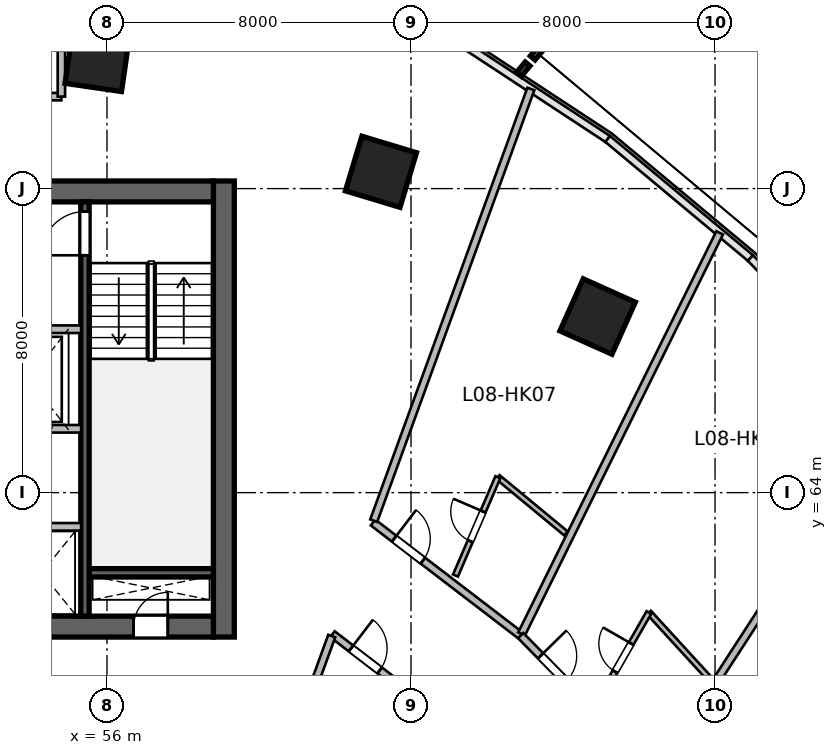
"""IFC4 building model, lengths in metres.
Left out: names, types, materials, properties, quantities, classifications, styles, units other than length and angle.
Written with IfcOpenShell. Run it as: python <this file> out.ifc"""

import sys

from ifc_helpers import new_model, si_unit, direction, frame, frame_2d, origin, origin_2d, place, context, subcontext, project, spatial, rectangle, extrude, source, transform, mapped, element, fill, save


model = new_model("IFC4")
c1 = context("Model", 3, precision=1e-05, world=origin(), true_north=direction((0.0, 1.0)))
c2 = subcontext(c1, "Body", "Model", "MODEL_VIEW")
j1 = project(units=[si_unit("LENGTHUNIT", "METRE"), si_unit("PLANEANGLEUNIT", "RADIAN")], contexts=[c1])
p1 = place(None, origin())
s1 = spatial("IfcSite", under=j1, at=p1, CompositionType="ELEMENT")
p2 = place(p1, origin())
s2 = spatial("IfcBuilding", under=s1, at=p2, CompositionType="ELEMENT")
p3 = place(p2, frame((0.0, 0.0, 42.6)))
s3 = spatial("IfcBuildingStorey", under=s2, at=p3, CompositionType="ELEMENT", Elevation=42.6)
m1 = source(origin(), c2, "Body", "SweptSolid", [
    extrude(rectangle(XDim=12.0, YDim=0.55, at=frame_2d((6.0, 0.0))), origin(), (0.0, 0.0, 1.0), 3.6),
])
p4 = place(p3, frame((59.075, 60.2, 0.0), z_axis=(0.0, 0.0, 1.0), x_axis=(0.0, 1.0, 0.0)))
e1 = element("IfcWall", 1, at=p4, inside=s3, PredefinedType="SHEAR", context=c2, shape_type="MappedRepresentation", body=[
    mapped(m1, transform((0.0, 0.0, 0.0), scale=1.0)),
])
m2 = source(origin(), c2, "Body", "SweptSolid", [
    extrude(rectangle(XDim=21.6, YDim=0.55, at=frame_2d((10.8, 0.0))), origin(), (0.0, 0.0, 1.0), 3.6),
])
p5 = place(p3, frame((37.2, 60.475, 0.0), z_axis=(0.0, 0.0, 1.0), x_axis=(1.0, 0.0, 0.0)))
e2 = element("IfcWall", 2, at=p5, inside=s3, PredefinedType="SHEAR", context=c2, shape_type="MappedRepresentation", body=[
    mapped(m2, transform((0.0, 0.0, 0.0), scale=1.0)),
])
p6 = place(p5, frame((1.1, 0.0, 0.0)))
e3 = element("IfcOpeningElement", 3, at=p6, cuts=e2, PredefinedType="OPENING", context=c2, shape_type="SweptSolid", body=[
    extrude(rectangle(XDim=1.15, YDim=2.15, at=frame_2d((0.575, 1.075))), frame((0.0, 0.285, 0.0), z_axis=(0.0, -1.0, 0.0), x_axis=(1.0, 0.0, 0.0)), (0.0, 0.0, 1.0), 0.57),
])
p7 = place(p5, frame((19.5, 0.0, 0.0)))
e4 = element("IfcOpeningElement", 4, at=p7, cuts=e2, PredefinedType="OPENING", context=c2, shape_type="SweptSolid", body=[
    extrude(rectangle(XDim=0.9, YDim=2.1, at=frame_2d((0.45, 1.05))), frame((0.0, 0.285, 0.0), z_axis=(0.0, -1.0, 0.0), x_axis=(1.0, 0.0, 0.0)), (0.0, 0.0, 1.0), 0.57),
])
p8 = place(p5, frame((12.02, 0.0, 0.0)))
e5 = element("IfcOpeningElement", 5, at=p8, cuts=e2, PredefinedType="OPENING", context=c2, shape_type="SweptSolid", body=[
    extrude(rectangle(XDim=1.6, YDim=2.15, at=frame_2d((0.8, 1.075))), frame((0.0, 0.285, 0.0), z_axis=(0.0, -1.0, 0.0), x_axis=(1.0, 0.0, 0.0)), (0.0, 0.0, 1.0), 0.57),
])
p9 = place(p3, frame((37.2, 71.925, 0.0), z_axis=(0.0, 0.0, 1.0), x_axis=(1.0, 0.0, 0.0)))
e6 = element("IfcWall", 6, at=p9, inside=s3, PredefinedType="SHEAR", context=c2, shape_type="MappedRepresentation", body=[
    mapped(m2, transform((0.0, 0.0, 0.0), scale=1.0)),
])
p10 = place(p9, frame((1.2, 0.0, 0.0)))
e7 = element("IfcOpeningElement", 7, at=p10, cuts=e6, PredefinedType="OPENING", context=c2, shape_type="SweptSolid", body=[
    extrude(rectangle(XDim=0.9, YDim=2.1, at=frame_2d((0.45, 1.05))), frame((0.0, 0.285, 0.0), z_axis=(0.0, -1.0, 0.0), x_axis=(1.0, 0.0, 0.0)), (0.0, 0.0, 1.0), 0.57),
])
p11 = place(p9, frame((14.7, 0.0, 0.0)))
e8 = element("IfcOpeningElement", 8, at=p11, cuts=e6, PredefinedType="OPENING", context=c2, shape_type="SweptSolid", body=[
    extrude(rectangle(XDim=1.2, YDim=2.15, at=frame_2d((0.6, 1.075))), frame((0.0, 0.285, 0.0), z_axis=(0.0, -1.0, 0.0), x_axis=(1.0, 0.0, 0.0)), (0.0, 0.0, 1.0), 0.57),
])
p12 = place(p9, frame((4.15, 0.0, 0.0)))
e9 = element("IfcOpeningElement", 9, at=p12, cuts=e6, PredefinedType="OPENING", context=c2, shape_type="SweptSolid", body=[
    extrude(rectangle(XDim=1.3, YDim=2.15, at=frame_2d((0.65, 1.075))), frame((0.0, 0.285, 0.0), z_axis=(0.0, -1.0, 0.0), x_axis=(1.0, 0.0, 0.0)), (0.0, 0.0, 1.0), 0.57),
])
p13 = place(p9, frame((7.25, 0.0, 0.0)))
e10 = element("IfcOpeningElement", 10, at=p13, cuts=e6, PredefinedType="OPENING", context=c2, shape_type="SweptSolid", body=[
    extrude(rectangle(XDim=0.9, YDim=2.1, at=frame_2d((0.45, 1.05))), frame((0.0, 0.285, 0.0), z_axis=(0.0, -1.0, 0.0), x_axis=(1.0, 0.0, 0.0)), (0.0, 0.0, 1.0), 0.57),
])
p14 = place(p9, frame((10.95, 0.0, 0.0)))
e11 = element("IfcOpeningElement", 11, at=p14, cuts=e6, PredefinedType="OPENING", context=c2, shape_type="SweptSolid", body=[
    extrude(rectangle(XDim=0.9, YDim=2.1, at=frame_2d((0.45, 1.05))), frame((0.0, 0.285, 0.0), z_axis=(0.0, -1.0, 0.0), x_axis=(1.0, 0.0, 0.0)), (0.0, 0.0, 1.0), 0.57),
])
m3 = source(origin(), c2, "Body", "SweptSolid", [
    extrude(rectangle(XDim=3.27, YDim=0.22, at=frame_2d((1.635, 0.0))), origin(), (0.0, 0.0, 1.0), 3.6),
])
p15 = place(p3, frame((55.53, 61.89, 0.0), z_axis=(0.0, 0.0, 1.0), x_axis=(1.0, 0.0, 0.0)))
e12 = element("IfcWall", 12, at=p15, inside=s3, PredefinedType="SHEAR", context=c2, shape_type="MappedRepresentation", body=[
    mapped(m3, transform((0.0, 0.0, 0.0), scale=1.0)),
])
m4 = source(origin(), c2, "Body", "SweptSolid", [
    extrude(rectangle(XDim=10.9, YDim=0.22, at=frame_2d((5.45, 0.0))), origin(), (0.0, 0.0, 1.0), 3.6),
])
p16 = place(p3, frame((55.42, 60.75, 0.0), z_axis=(0.0, 0.0, 1.0), x_axis=(0.0, 1.0, 0.0)))
e13 = element("IfcWall", 13, at=p16, inside=s3, PredefinedType="SHEAR", context=c2, shape_type="MappedRepresentation", body=[
    mapped(m4, transform((0.0, 0.0, 0.0), scale=1.0)),
])
p17 = place(p16, frame((9.495, 0.0, 0.0)))
e14 = element("IfcOpeningElement", 14, at=p17, cuts=e13, PredefinedType="OPENING", context=c2, shape_type="SweptSolid", body=[
    extrude(rectangle(XDim=1.15, YDim=2.15, at=frame_2d((0.575, 1.075))), frame((0.0, 0.12, 0.0), z_axis=(0.0, -1.0, 0.0), x_axis=(1.0, 0.0, 0.0)), (0.0, 0.0, 1.0), 0.24),
])
m5 = source(origin(), c2, "Body", "SweptSolid", [
    extrude(rectangle(XDim=1.5, YDim=1.5, at=origin_2d()), origin(), (0.0, 0.0, 1.0), 3.6),
])
for number, where, z_axis, x_axis in (
    (15, (55.747, 75.404, 0.0), (0.0, 0.0, 1.0), (0.143, 0.99, 0.0)),
    (16, (63.209, 72.442, 0.0), (0.0, 0.0, 1.0), (0.289, 0.957, 0.0)),
    (17, (68.91, 68.633, 0.0), (0.0, 0.0, 1.0), (0.409, 0.912, 0.0)),
):
    element("IfcColumn", number, at=place(p3, frame(where, z_axis=z_axis, x_axis=x_axis)), inside=s3, PredefinedType="COLUMN", context=c2, shape_type="MappedRepresentation", body=[
        mapped(m5, transform((0.0, 0.0, 0.0), scale=1.0)),
    ])
m6 = source(origin(), c2, "Body", "SweptSolid", [
    extrude(rectangle(XDim=5.62, YDim=0.2, at=frame_2d((2.81, 0.0))), origin(), (0.0, 0.0, 1.0), 3.36),
])
p18 = place(p3, frame((49.7, 68.3, 0.0), z_axis=(0.0, 0.0, 1.0), x_axis=(1.0, 0.0, 0.0)))
e18 = element("IfcWall", 18, at=p18, inside=s3, PredefinedType="SOLIDWALL", context=c2, shape_type="MappedRepresentation", body=[
    mapped(m6, transform((0.0, 0.0, 0.0), scale=1.0)),
])
p19 = place(p18, frame((1.6, 0.0, 0.0)))
e19 = element("IfcOpeningElement", 19, at=p19, cuts=e18, PredefinedType="OPENING", context=c2, shape_type="SweptSolid", body=[
    extrude(rectangle(XDim=1.1, YDim=2.15, at=frame_2d((0.55, 1.075))), frame((0.0, 0.11, 0.0), z_axis=(0.0, -1.0, 0.0), x_axis=(1.0, 0.0, 0.0)), (0.0, 0.0, 1.0), 0.22),
])
p20 = place(p18, frame((3.7, 0.0, 0.0)))
e20 = element("IfcOpeningElement", 20, at=p20, cuts=e18, PredefinedType="OPENING", context=c2, shape_type="SweptSolid", body=[
    extrude(rectangle(XDim=1.1, YDim=2.15, at=frame_2d((0.55, 1.075))), frame((0.0, 0.11, 0.0), z_axis=(0.0, -1.0, 0.0), x_axis=(1.0, 0.0, 0.0)), (0.0, 0.0, 1.0), 0.22),
])
p21 = place(p3, frame((49.7, 65.68, 0.0), z_axis=(0.0, 0.0, 1.0), x_axis=(1.0, 0.0, 0.0)))
e21 = element("IfcWall", 21, at=p21, inside=s3, PredefinedType="SOLIDWALL", context=c2, shape_type="MappedRepresentation", body=[
    mapped(m6, transform((0.0, 0.0, 0.0), scale=1.0)),
])
m7 = source(origin(), c2, "Body", "SweptSolid", [
    extrude(rectangle(XDim=4.1, YDim=0.2, at=frame_2d((2.05, 0.0))), origin(), (0.0, 0.0, 1.0), 3.36),
])
p22 = place(p3, frame((51.22, 63.1, 0.0), z_axis=(0.0, 0.0, 1.0), x_axis=(1.0, 0.0, 0.0)))
e22 = element("IfcWall", 22, at=p22, inside=s3, PredefinedType="SOLIDWALL", context=c2, shape_type="MappedRepresentation", body=[
    mapped(m7, transform((0.0, 0.0, 0.0), scale=1.0)),
])
m8 = source(origin(), c2, "Body", "SweptSolid", [
    extrude(rectangle(XDim=6.8, YDim=0.195, at=frame_2d((3.4, 0.0))), origin(), (0.0, 0.0, 1.0), 3.36),
])
p23 = place(p3, frame((48.0, 74.42, 0.0), z_axis=(0.0, 0.0, 1.0), x_axis=(1.0, 0.0, 0.0)))
e23 = element("IfcWall", 23, at=p23, inside=s3, PredefinedType="PARTITIONING", context=c2, shape_type="MappedRepresentation", body=[
    mapped(m8, transform((0.0, 0.0, 0.0), scale=1.0)),
])
p24 = place(p23, frame((4.421, 0.0, 0.0)))
e24 = element("IfcOpeningElement", 24, at=p24, cuts=e23, PredefinedType="OPENING", context=c2, shape_type="SweptSolid", body=[
    extrude(rectangle(XDim=0.95, YDim=2.15, at=frame_2d((0.475, 1.075))), frame((0.0, 0.107, 0.0), z_axis=(0.0, -1.0, 0.0), x_axis=(1.0, 0.0, 0.0)), (0.0, 0.0, 1.0), 0.215),
])
m9 = source(origin(), c2, "Body", "SweptSolid", [
    extrude(rectangle(XDim=5.426, YDim=0.195, at=frame_2d((2.713, 0.0))), origin(), (0.0, 0.0, 1.0), 3.36),
])
p25 = place(p3, frame((54.8, 74.42, 0.0), z_axis=(0.0, 0.0, 1.0), x_axis=(0.0, 1.0, 0.0)))
e25 = element("IfcWall", 25, at=p25, inside=s3, PredefinedType="PARTITIONING", context=c2, shape_type="MappedRepresentation", body=[
    mapped(m9, transform((0.0, 0.0, 0.0), scale=1.0)),
])
m10 = source(origin(), c2, "Body", "SweptSolid", [
    extrude(rectangle(XDim=4.895, YDim=0.195, at=frame_2d((2.447, 0.0))), origin(), (0.0, 0.0, 1.0), 3.36),
])
p26 = place(p3, frame((63.001, 63.214, 0.0), z_axis=(0.0, 0.0, 1.0), x_axis=(0.793896075849, -0.608053468661, 0.0)))
e26 = element("IfcWall", 26, at=p26, inside=s3, PredefinedType="PARTITIONING", context=c2, shape_type="MappedRepresentation", body=[
    mapped(m10, transform((0.0, 0.0, 0.0), scale=1.0)),
])
p27 = place(p26, frame((0.7, 0.0, 0.0)))
e27 = element("IfcOpeningElement", 27, at=p27, cuts=e26, PredefinedType="OPENING", context=c2, shape_type="SweptSolid", body=[
    extrude(rectangle(XDim=0.95, YDim=2.15, at=frame_2d((0.475, 1.075))), frame((0.0, 0.107, 0.0), z_axis=(0.0, -1.0, 0.0), x_axis=(1.0, 0.0, 0.0)), (0.0, 0.0, 1.0), 0.215),
])
m11 = source(origin(), c2, "Body", "SweptSolid", [
    extrude(rectangle(XDim=12.088, YDim=0.195, at=frame_2d((6.044, 0.0))), origin(), (0.0, 0.0, 1.0), 3.36),
])
p28 = place(p3, frame((63.019, 63.262, 0.0), z_axis=(0.0, 0.0, 1.0), x_axis=(0.34203007529, 0.939689005787, 0.0)))
e28 = element("IfcWall", 28, at=p28, inside=s3, PredefinedType="PARTITIONING", context=c2, shape_type="MappedRepresentation", body=[
    mapped(m11, transform((0.0, 0.0, 0.0), scale=1.0)),
])
m12 = source(origin(), c2, "Body", "SweptSolid", [
    extrude(rectangle(XDim=11.77, YDim=0.195, at=frame_2d((5.885, 0.0))), origin(), (0.0, 0.0, 1.0), 3.36),
])
p29 = place(p3, frame((66.909, 60.282, 0.0), z_axis=(0.0, 0.0, 1.0), x_axis=(0.44286060326, 0.896590478468, 0.0)))
e29 = element("IfcWall", 29, at=p29, inside=s3, PredefinedType="PARTITIONING", context=c2, shape_type="MappedRepresentation", body=[
    mapped(m12, transform((0.0, 0.0, 0.0), scale=1.0)),
])
m13 = source(origin(), c2, "Body", "SweptSolid", [
    extrude(rectangle(XDim=2.324, YDim=0.14, at=frame_2d((1.162, 0.0))), origin(), (0.0, 0.0, 1.0), 3.36),
])
p30 = place(p3, frame((66.286, 64.407, 0.0), z_axis=(0.0, 0.0, 1.0), x_axis=(0.770746444956, -0.637141991701, 0.0)))
e30 = element("IfcWall", 30, at=p30, inside=s3, PredefinedType="PARTITIONING", context=c2, shape_type="MappedRepresentation", body=[
    mapped(m13, transform((0.0, 0.0, 0.0), scale=1.0)),
])
m14 = source(origin(), c2, "Body", "SweptSolid", [
    extrude(rectangle(XDim=2.818, YDim=0.14, at=frame_2d((1.409, 0.0))), origin(), (0.0, 0.0, 1.0), 3.36),
])
p31 = place(p3, frame((65.17, 61.819, 0.0), z_axis=(0.0, 0.0, 1.0), x_axis=(0.395894859341, 0.918295845764, 0.0)))
e31 = element("IfcWall", 31, at=p31, inside=s3, PredefinedType="PARTITIONING", context=c2, shape_type="MappedRepresentation", body=[
    mapped(m14, transform((0.0, 0.0, 0.0), scale=1.0)),
])
p32 = place(p31, frame((0.984, 0.0, 0.0)))
e32 = element("IfcOpeningElement", 32, at=p32, cuts=e31, PredefinedType="OPENING", context=c2, shape_type="SweptSolid", body=[
    extrude(rectangle(XDim=0.85, YDim=2.05, at=frame_2d((0.425, 1.025))), frame((0.0, 0.08, 0.0), z_axis=(0.0, -1.0, 0.0), x_axis=(1.0, 0.0, 0.0)), (0.0, 0.0, 1.0), 0.16),
])
m15 = source(origin(), c2, "Body", "SweptSolid", [
    extrude(rectangle(XDim=4.546, YDim=0.195, at=frame_2d((2.273, 0.0))), origin(), (0.0, 0.0, 1.0), 3.36),
])
p33 = place(p3, frame((61.931, 60.275, 0.0), z_axis=(0.0, 0.0, 1.0), x_axis=(0.793907931297, -0.608037989457, 0.0)))
e33 = element("IfcWall", 33, at=p33, inside=s3, PredefinedType="PARTITIONING", context=c2, shape_type="MappedRepresentation", body=[
    mapped(m15, transform((0.0, 0.0, 0.0), scale=1.0)),
])
p34 = place(p33, frame((0.616, 0.0, 0.0)))
e34 = element("IfcOpeningElement", 34, at=p34, cuts=e33, PredefinedType="OPENING", context=c2, shape_type="SweptSolid", body=[
    extrude(rectangle(XDim=0.95, YDim=2.15, at=frame_2d((0.475, 1.075))), frame((0.0, 0.107, 0.0), z_axis=(0.0, -1.0, 0.0), x_axis=(1.0, 0.0, 0.0)), (0.0, 0.0, 1.0), 0.215),
])
m16 = source(origin(), c2, "Body", "SweptSolid", [
    extrude(rectangle(XDim=12.196, YDim=0.195, at=frame_2d((6.098, 0.0))), origin(), (0.0, 0.0, 1.0), 3.36),
])
p35 = place(p3, frame((57.742, 48.766, 0.0), z_axis=(0.0, 0.0, 1.0), x_axis=(0.342022711534, 0.939691686031, 0.0)))
e35 = element("IfcWall", 35, at=p35, inside=s3, PredefinedType="PARTITIONING", context=c2, shape_type="MappedRepresentation", body=[
    mapped(m16, transform((0.0, 0.0, 0.0), scale=1.0)),
])
m17 = source(origin(), c2, "Body", "SweptSolid", [
    extrude(rectangle(XDim=5.087, YDim=0.195, at=frame_2d((2.543, 0.0))), origin(), (0.0, 0.0, 1.0), 3.36),
])
p36 = place(p3, frame((66.887, 60.238, 0.0), z_axis=(0.0, 0.0, 1.0), x_axis=(0.700428330775, -0.7137227427, 0.0)))
e36 = element("IfcWall", 36, at=p36, inside=s3, PredefinedType="PARTITIONING", context=c2, shape_type="MappedRepresentation", body=[
    mapped(m17, transform((0.0, 0.0, 0.0), scale=1.0)),
])
p37 = place(p36, frame((0.746, 0.0, 0.0)))
e37 = element("IfcOpeningElement", 37, at=p37, cuts=e36, PredefinedType="OPENING", context=c2, shape_type="SweptSolid", body=[
    extrude(rectangle(XDim=0.95, YDim=2.15, at=frame_2d((0.475, 1.075))), frame((0.0, 0.107, 0.0), z_axis=(0.0, -1.0, 0.0), x_axis=(1.0, 0.0, 0.0)), (0.0, 0.0, 1.0), 0.215),
])
m18 = source(origin(), c2, "Body", "SweptSolid", [
    extrude(rectangle(XDim=11.403, YDim=0.195, at=frame_2d((5.701, 0.0))), origin(), (0.0, 0.0, 1.0), 3.36),
])
p38 = place(p3, frame((70.477, 56.647, 0.0), z_axis=(0.0, 0.0, 1.0), x_axis=(0.544246090008, 0.838925618581, 0.0)))
e38 = element("IfcWall", 38, at=p38, inside=s3, PredefinedType="PARTITIONING", context=c2, shape_type="MappedRepresentation", body=[
    mapped(m18, transform((0.0, 0.0, 0.0), scale=1.0)),
])
m19 = source(origin(), c2, "Body", "SweptSolid", [
    extrude(rectangle(XDim=2.416, YDim=0.14, at=frame_2d((1.208, 0.0))), origin(), (0.0, 0.0, 1.0), 3.36),
])
p39 = place(p3, frame((70.26, 60.846, 0.0), z_axis=(0.0, 0.0, 1.0), x_axis=(0.675399637907, -0.737451916476, 0.0)))
e39 = element("IfcWall", 39, at=p39, inside=s3, PredefinedType="PARTITIONING", context=c2, shape_type="MappedRepresentation", body=[
    mapped(m19, transform((0.0, 0.0, 0.0), scale=1.0)),
])
m20 = source(origin(), c2, "Body", "SweptSolid", [
    extrude(rectangle(XDim=2.732, YDim=0.14, at=frame_2d((1.366, 0.0))), origin(), (0.0, 0.0, 1.0), 3.36),
])
p40 = place(p3, frame((68.902, 58.476, 0.0), z_axis=(0.0, 0.0, 1.0), x_axis=(0.497254966372, 0.867604459658, 0.0)))
e40 = element("IfcWall", 40, at=p40, inside=s3, PredefinedType="PARTITIONING", context=c2, shape_type="MappedRepresentation", body=[
    mapped(m20, transform((0.0, 0.0, 0.0), scale=1.0)),
])
p41 = place(p40, frame((0.941, 0.0, 0.0)))
e41 = element("IfcOpeningElement", 41, at=p41, cuts=e40, PredefinedType="OPENING", context=c2, shape_type="SweptSolid", body=[
    extrude(rectangle(XDim=0.85, YDim=2.05, at=frame_2d((0.425, 1.025))), frame((0.0, 0.08, 0.0), z_axis=(0.0, -1.0, 0.0), x_axis=(1.0, 0.0, 0.0)), (0.0, 0.0, 1.0), 0.16),
])
m21 = source(origin(), c2, "Body", "SweptSolid", [
    extrude(rectangle(XDim=0.9, YDim=2.1, at=frame_2d((0.45, 1.05))), frame((0.0, 0.025, 0.0), z_axis=(0.0, -1.0, 0.0), x_axis=(1.0, 0.0, 0.0)), (0.0, 0.0, 1.0), 0.05),
])
p42 = place(p7, origin())
e42 = element("IfcDoor", 42, at=p42, inside=s3, OperationType="SINGLE_SWING_RIGHT", PredefinedType="DOOR", context=c2, shape_type="MappedRepresentation", body=[
    mapped(m21, transform((0.0, 0.0, 0.0), scale=1.0)),
])
fill(e4, e42)
m22 = source(origin(), c2, "Body", "SweptSolid", [
    extrude(rectangle(XDim=1.15, YDim=2.15, at=frame_2d((0.575, 1.075))), frame((0.0, 0.025, 0.0), z_axis=(0.0, -1.0, 0.0), x_axis=(1.0, 0.0, 0.0)), (0.0, 0.0, 1.0), 0.05),
])
p43 = place(p17, origin())
e43 = element("IfcDoor", 43, at=p43, inside=s3, OperationType="SINGLE_SWING_LEFT", PredefinedType="DOOR", context=c2, shape_type="MappedRepresentation", body=[
    mapped(m22, transform((0.0, 0.0, 0.0), scale=1.0)),
])
fill(e14, e43)
m23 = source(origin(), c2, "Body", "SweptSolid", [
    extrude(rectangle(XDim=0.95, YDim=2.15, at=frame_2d((0.475, 1.075))), frame((0.0, 0.025, 0.0), z_axis=(0.0, -1.0, 0.0), x_axis=(1.0, 0.0, 0.0)), (0.0, 0.0, 1.0), 0.05),
])
p44 = place(p27, origin())
e44 = element("IfcDoor", 44, at=p44, inside=s3, OperationType="SINGLE_SWING_LEFT", PredefinedType="DOOR", context=c2, shape_type="MappedRepresentation", body=[
    mapped(m23, transform((0.0, 0.0, 0.0), scale=1.0)),
])
fill(e27, e44)
m24 = source(origin(), c2, "Body", "SweptSolid", [
    extrude(rectangle(XDim=0.85, YDim=2.05, at=frame_2d((0.425, 1.025))), frame((0.0, 0.025, 0.0), z_axis=(0.0, -1.0, 0.0), x_axis=(1.0, 0.0, 0.0)), (0.0, 0.0, 1.0), 0.05),
])
p45 = place(p32, origin())
e45 = element("IfcDoor", 45, at=p45, inside=s3, OperationType="SINGLE_SWING_RIGHT", PredefinedType="DOOR", context=c2, shape_type="MappedRepresentation", body=[
    mapped(m24, transform((0.0, 0.0, 0.0), scale=1.0)),
])
fill(e32, e45)
p46 = place(p34, origin())
e46 = element("IfcDoor", 46, at=p46, inside=s3, OperationType="SINGLE_SWING_LEFT", PredefinedType="DOOR", context=c2, shape_type="MappedRepresentation", body=[
    mapped(m23, transform((0.0, 0.0, 0.0), scale=1.0)),
])
fill(e34, e46)
p47 = place(p37, origin())
e47 = element("IfcDoor", 47, at=p47, inside=s3, OperationType="SINGLE_SWING_LEFT", PredefinedType="DOOR", context=c2, shape_type="MappedRepresentation", body=[
    mapped(m23, transform((0.0, 0.0, 0.0), scale=1.0)),
])
fill(e37, e47)
p48 = place(p41, origin())
e48 = element("IfcDoor", 48, at=p48, inside=s3, OperationType="SINGLE_SWING_RIGHT", PredefinedType="DOOR", context=c2, shape_type="MappedRepresentation", body=[
    mapped(m24, transform((0.0, 0.0, 0.0), scale=1.0)),
])
fill(e41, e48)
save(model, sys.argv[1])
